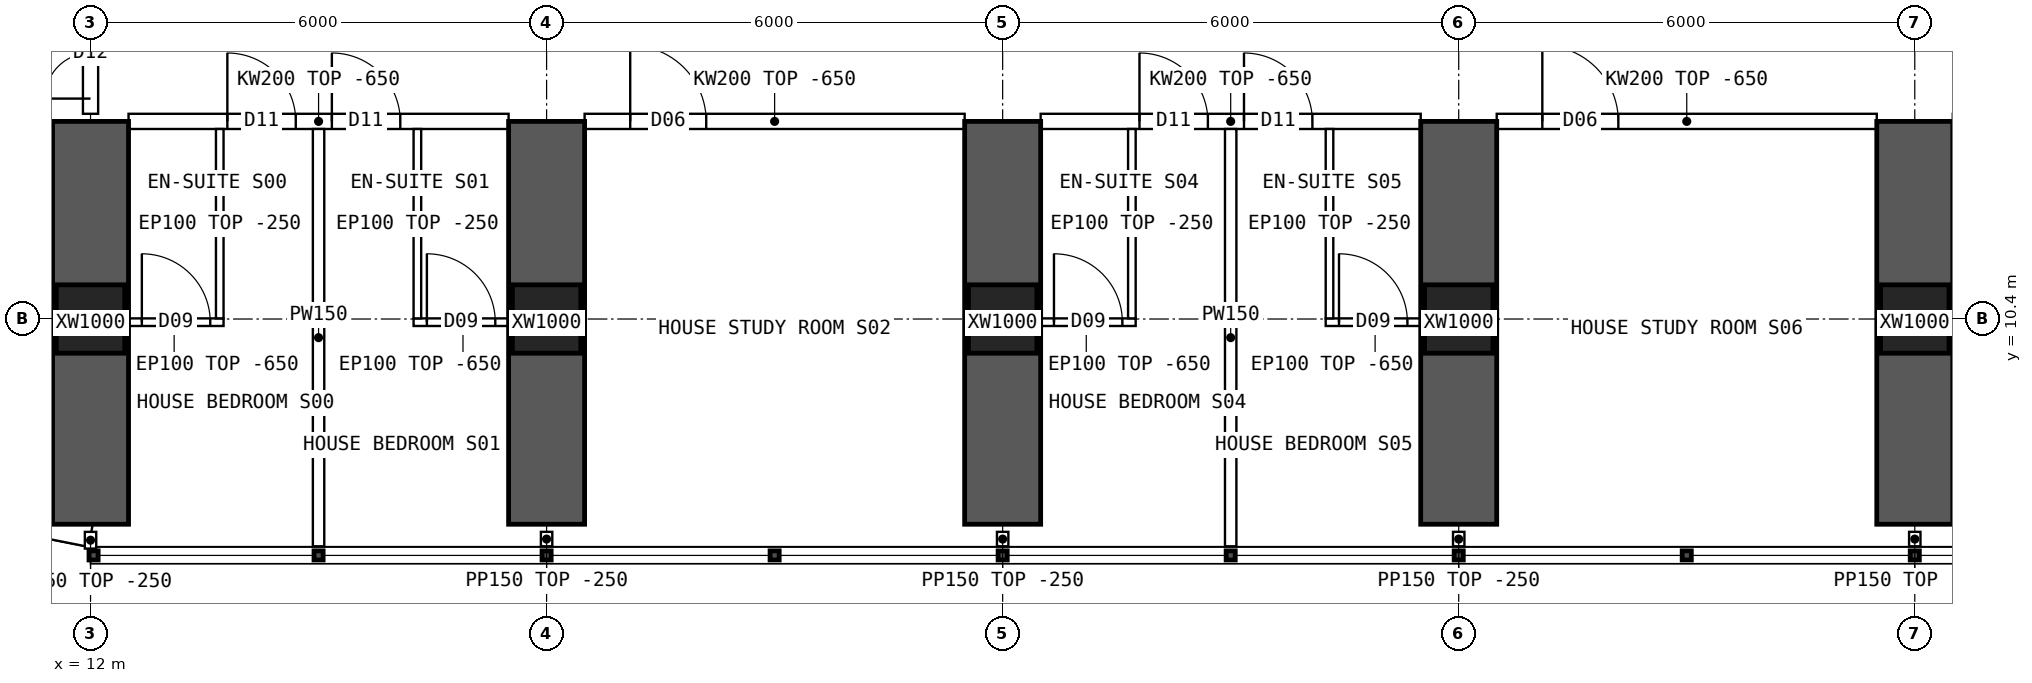
"""IFC4 building model, lengths in metres.
Left out: names, types, materials, properties, quantities, classifications, styles, units other than length and angle.
Written with IfcOpenShell. Run it as: python <this file> out.ifc"""

import sys

from ifc_helpers import new_model, si_unit, direction, frame, frame_2d, origin, origin_2d, place, context, subcontext, project, spatial, polyline, rectangle, hollow_rectangle, outline, extrude, element, fill, save


model = new_model("IFC4")
c1 = context("Model", 3, precision=1e-05, world=origin(), true_north=direction((0.0, 1.0)))
c2 = subcontext(c1, "Body", "Model", "MODEL_VIEW")
j1 = project(units=[si_unit("LENGTHUNIT", "METRE"), si_unit("PLANEANGLEUNIT", "RADIAN")], contexts=[c1])
p1 = place(None, origin())
s1 = spatial("IfcSite", under=j1, at=p1, CompositionType="ELEMENT")
p2 = place(p1, origin())
s2 = spatial("IfcBuilding", under=s1, at=p2, CompositionType="ELEMENT")
p3 = place(p2, frame((0.0, 0.0, 61.45)))
s3 = spatial("IfcBuildingStorey", under=s2, at=p3, CompositionType="ELEMENT", Elevation=61.45)
for number, where, z_axis, x_axis in (
    (1, (12.0, 10.4, 0.0), (0.0, 0.0, 1.0), (1.0, 0.0, 0.0)),
    (2, (18.0, 10.4, 0.0), (0.0, 0.0, 1.0), (1.0, 0.0, 0.0)),
    (3, (24.0, 10.4, 0.0), (0.0, 0.0, 1.0), (1.0, 0.0, 0.0)),
    (4, (30.0, 10.4, 0.0), (0.0, 0.0, 1.0), (1.0, 0.0, 0.0)),
    (5, (36.0, 10.4, 0.0), (0.0, 0.0, 1.0), (1.0, 0.0, 0.0)),
):
    element("IfcColumn", number, at=place(p3, frame(where, z_axis=z_axis, x_axis=x_axis)), inside=s3, PredefinedType="COLUMN", context=c2, shape_type="SweptSolid", body=[
        extrude(hollow_rectangle(XDim=0.9, YDim=0.9, WallThickness=0.09, at=origin_2d()), origin(), (0.0, 0.0, 1.0), 3.75),
    ])
for number, where, z_axis, x_axis in (
    (6, (12.0, 7.7, 0.0), (0.0, 0.0, 1.0), (0.0, 1.0, 0.0)),
    (7, (18.0, 7.7, 0.0), (0.0, 0.0, 1.0), (0.0, 1.0, 0.0)),
    (8, (24.0, 7.7, 0.0), (0.0, 0.0, 1.0), (0.0, 1.0, 0.0)),
    (9, (30.0, 7.7, 0.0), (0.0, 0.0, 1.0), (0.0, 1.0, 0.0)),
    (10, (36.0, 7.7, 0.0), (0.0, 0.0, 1.0), (0.0, 1.0, 0.0)),
):
    element("IfcWall", number, at=place(p3, frame(where, z_axis=z_axis, x_axis=x_axis)), inside=s3, PredefinedType="SHEAR", context=c2, shape_type="SweptSolid", body=[
        extrude(rectangle(XDim=5.3, YDim=1.0, at=frame_2d((2.65, 0.0))), origin(), (0.0, 0.0, 1.0), 3.75),
    ])
p4 = place(p3, frame((8.843, 8.178, 0.0), z_axis=(0.0, 0.0, 1.0), x_axis=(0.980787251524, -0.195080412259, 0.0)))
e11 = element("IfcWall", 11, at=p4, inside=s3, PredefinedType="SOLIDWALL", context=c2, shape_type="SweptSolid", body=[
    extrude(outline(polyline([(-0.03, -0.15), (3.249, -0.15), (3.189, 0.15), (0.03, 0.15), (-0.03, -0.15)])), origin(), (0.0, 0.0, 1.0), 3.5),
])
p5 = place(p4, frame((0.909, 0.0, 0.9)))
e12 = element("IfcOpeningElement", 12, at=p5, cuts=e11, PredefinedType="OPENING", context=c2, shape_type="SweptSolid", body=[
    extrude(rectangle(XDim=1.4, YDim=1.8, at=frame_2d((0.7, 0.9))), frame((0.0, 0.16, 0.0), z_axis=(0.0, -1.0, 0.0), x_axis=(1.0, 0.0, 0.0)), (0.0, 0.0, 1.0), 0.32),
])
p6 = place(p3, frame((12.5, 13.0, 0.0), z_axis=(0.0, 0.0, 1.0), x_axis=(1.0, 0.0, 0.0)))
e13 = element("IfcWall", 13, at=p6, inside=s3, PredefinedType="SOLIDWALL", context=c2, shape_type="SweptSolid", body=[
    extrude(outline(polyline([(0.0, 0.0), (5.0, 0.0), (5.0, 3.1), (0.0, 3.1), (0.0, 0.0)])), frame((0.0, 0.1, 0.0), z_axis=(0.0, -1.0, 0.0), x_axis=(1.0, 0.0, 0.0)), (0.0, 0.0, 1.0), 0.2),
])
p7 = place(p6, frame((1.3, 0.0, 0.0)))
e14 = element("IfcOpeningElement", 14, at=p7, cuts=e13, PredefinedType="OPENING", context=c2, shape_type="SweptSolid", body=[
    extrude(rectangle(XDim=0.9, YDim=2.1, at=frame_2d((0.45, 1.05))), frame((0.0, 0.11, 0.0), z_axis=(0.0, -1.0, 0.0), x_axis=(1.0, 0.0, 0.0)), (0.0, 0.0, 1.0), 0.22),
])
p8 = place(p6, frame((2.675, 0.0, 0.0)))
e15 = element("IfcOpeningElement", 15, at=p8, cuts=e13, PredefinedType="OPENING", context=c2, shape_type="SweptSolid", body=[
    extrude(rectangle(XDim=0.9, YDim=2.1, at=frame_2d((0.45, 1.05))), frame((0.0, 0.11, 0.0), z_axis=(0.0, -1.0, 0.0), x_axis=(1.0, 0.0, 0.0)), (0.0, 0.0, 1.0), 0.22),
])
p9 = place(p3, frame((18.5, 13.0, 0.0), z_axis=(0.0, 0.0, 1.0), x_axis=(1.0, 0.0, 0.0)))
e16 = element("IfcWall", 16, at=p9, inside=s3, PredefinedType="SOLIDWALL", context=c2, shape_type="SweptSolid", body=[
    extrude(outline(polyline([(0.0, 0.0), (5.0, 0.0), (5.0, 3.1), (0.0, 3.1), (0.0, 0.0)])), frame((0.0, 0.1, 0.0), z_axis=(0.0, -1.0, 0.0), x_axis=(1.0, 0.0, 0.0)), (0.0, 0.0, 1.0), 0.2),
])
p10 = place(p9, frame((0.6, 0.0, 0.0)))
e17 = element("IfcOpeningElement", 17, at=p10, cuts=e16, PredefinedType="OPENING", context=c2, shape_type="SweptSolid", body=[
    extrude(rectangle(XDim=1.0, YDim=2.1, at=frame_2d((0.5, 1.05))), frame((0.0, 0.11, 0.0), z_axis=(0.0, -1.0, 0.0), x_axis=(1.0, 0.0, 0.0)), (0.0, 0.0, 1.0), 0.22),
])
p11 = place(p3, frame((24.5, 13.0, 0.0), z_axis=(0.0, 0.0, 1.0), x_axis=(1.0, 0.0, 0.0)))
e18 = element("IfcWall", 18, at=p11, inside=s3, PredefinedType="SOLIDWALL", context=c2, shape_type="SweptSolid", body=[
    extrude(outline(polyline([(0.0, 0.0), (5.0, 0.0), (5.0, 3.1), (0.0, 3.1), (0.0, 0.0)])), frame((0.0, 0.1, 0.0), z_axis=(0.0, -1.0, 0.0), x_axis=(1.0, 0.0, 0.0)), (0.0, 0.0, 1.0), 0.2),
])
p12 = place(p11, frame((1.3, 0.0, 0.0)))
e19 = element("IfcOpeningElement", 19, at=p12, cuts=e18, PredefinedType="OPENING", context=c2, shape_type="SweptSolid", body=[
    extrude(rectangle(XDim=0.9, YDim=2.1, at=frame_2d((0.45, 1.05))), frame((0.0, 0.11, 0.0), z_axis=(0.0, -1.0, 0.0), x_axis=(1.0, 0.0, 0.0)), (0.0, 0.0, 1.0), 0.22),
])
p13 = place(p11, frame((2.675, 0.0, 0.0)))
e20 = element("IfcOpeningElement", 20, at=p13, cuts=e18, PredefinedType="OPENING", context=c2, shape_type="SweptSolid", body=[
    extrude(rectangle(XDim=0.9, YDim=2.1, at=frame_2d((0.45, 1.05))), frame((0.0, 0.11, 0.0), z_axis=(0.0, -1.0, 0.0), x_axis=(1.0, 0.0, 0.0)), (0.0, 0.0, 1.0), 0.22),
])
p14 = place(p3, frame((30.5, 13.0, 0.0), z_axis=(0.0, 0.0, 1.0), x_axis=(1.0, 0.0, 0.0)))
e21 = element("IfcWall", 21, at=p14, inside=s3, PredefinedType="SOLIDWALL", context=c2, shape_type="SweptSolid", body=[
    extrude(outline(polyline([(0.0, 0.0), (5.0, 0.0), (5.0, 3.1), (0.0, 3.1), (0.0, 0.0)])), frame((0.0, 0.1, 0.0), z_axis=(0.0, -1.0, 0.0), x_axis=(1.0, 0.0, 0.0)), (0.0, 0.0, 1.0), 0.2),
])
p15 = place(p14, frame((0.6, 0.0, 0.0)))
e22 = element("IfcOpeningElement", 22, at=p15, cuts=e21, PredefinedType="OPENING", context=c2, shape_type="SweptSolid", body=[
    extrude(rectangle(XDim=1.0, YDim=2.1, at=frame_2d((0.5, 1.05))), frame((0.0, 0.11, 0.0), z_axis=(0.0, -1.0, 0.0), x_axis=(1.0, 0.0, 0.0)), (0.0, 0.0, 1.0), 0.22),
])
p16 = place(p3, frame((15.0, 7.41, 0.0), z_axis=(0.0, 0.0, 1.0), x_axis=(0.0, 1.0, 0.0)))
e23 = element("IfcWall", 23, at=p16, inside=s3, PredefinedType="PARTITIONING", context=c2, shape_type="SweptSolid", body=[
    extrude(outline(polyline([(0.0, 0.0), (5.49, 0.0), (5.49, 3.1), (5.442, 3.1), (5.44, 3.5), (3.192, 3.5), (3.19, 3.1), (2.792, 3.1), (2.79, 3.5), (0.0, 3.5), (0.0, 0.0)])), frame((0.0, 0.075, 0.0), z_axis=(0.0, -1.0, 0.0), x_axis=(1.0, 0.0, 0.0)), (0.0, 0.0, 1.0), 0.15),
])
p17 = place(p3, frame((13.75, 10.358, 0.0), z_axis=(0.0, 0.0, 1.0), x_axis=(-1.0, 0.0, 0.0)))
e24 = element("IfcWall", 24, at=p17, inside=s3, PredefinedType="PARTITIONING", context=c2, shape_type="SweptSolid", body=[
    extrude(outline(polyline([(0.0, 0.0), (1.3, 0.0), (1.3, 3.1), (0.0, 3.1), (0.0, 0.0)])), frame((0.0, 0.05, 0.0), z_axis=(0.0, -1.0, 0.0), x_axis=(1.0, 0.0, 0.0)), (0.0, 0.0, 1.0), 0.1),
])
p18 = place(p17, frame((0.175, 0.0, 0.0)))
e25 = element("IfcOpeningElement", 25, at=p18, cuts=e24, PredefinedType="OPENING", context=c2, shape_type="SweptSolid", body=[
    extrude(rectangle(XDim=0.9, YDim=2.1, at=frame_2d((0.45, 1.05))), frame((0.0, 0.06, 0.0), z_axis=(0.0, -1.0, 0.0), x_axis=(1.0, 0.0, 0.0)), (0.0, 0.0, 1.0), 0.12),
])
p19 = place(p3, frame((13.7, 10.408, 0.0), z_axis=(0.0, 0.0, 1.0), x_axis=(0.0, 1.0, 0.0)))
e26 = element("IfcWall", 26, at=p19, inside=s3, PredefinedType="PARTITIONING", context=c2, shape_type="SweptSolid", body=[
    extrude(outline(polyline([(0.0, 0.0), (2.492, 0.0), (2.492, 3.1), (2.444, 3.1), (2.442, 3.5), (0.194, 3.5), (0.192, 3.1), (0.0, 3.1), (0.0, 0.0)])), frame((0.0, 0.05, 0.0), z_axis=(0.0, -1.0, 0.0), x_axis=(1.0, 0.0, 0.0)), (0.0, 0.0, 1.0), 0.1),
])
p20 = place(p3, frame((17.55, 10.358, 0.0), z_axis=(0.0, 0.0, 1.0), x_axis=(-1.0, 0.0, 0.0)))
e27 = element("IfcWall", 27, at=p20, inside=s3, PredefinedType="PARTITIONING", context=c2, shape_type="SweptSolid", body=[
    extrude(outline(polyline([(0.0, 0.0), (1.3, 0.0), (1.3, 3.1), (0.0, 3.1), (0.0, 0.0)])), frame((0.0, 0.05, 0.0), z_axis=(0.0, -1.0, 0.0), x_axis=(1.0, 0.0, 0.0)), (0.0, 0.0, 1.0), 0.1),
])
p21 = place(p20, frame((0.225, 0.0, 0.0)))
e28 = element("IfcOpeningElement", 28, at=p21, cuts=e27, PredefinedType="OPENING", context=c2, shape_type="SweptSolid", body=[
    extrude(rectangle(XDim=0.9, YDim=2.1, at=frame_2d((0.45, 1.05))), frame((0.0, 0.06, 0.0), z_axis=(0.0, -1.0, 0.0), x_axis=(1.0, 0.0, 0.0)), (0.0, 0.0, 1.0), 0.12),
])
p22 = place(p3, frame((16.3, 10.408, 0.0), z_axis=(0.0, 0.0, 1.0), x_axis=(0.0, 1.0, 0.0)))
e29 = element("IfcWall", 29, at=p22, inside=s3, PredefinedType="PARTITIONING", context=c2, shape_type="SweptSolid", body=[
    extrude(outline(polyline([(0.0, 0.0), (2.492, 0.0), (2.492, 3.1), (2.444, 3.1), (2.442, 3.5), (0.194, 3.5), (0.192, 3.1), (0.0, 3.1), (0.0, 0.0)])), frame((0.0, 0.05, 0.0), z_axis=(0.0, -1.0, 0.0), x_axis=(1.0, 0.0, 0.0)), (0.0, 0.0, 1.0), 0.1),
])
p23 = place(p3, frame((27.0, 7.41, 0.0), z_axis=(0.0, 0.0, 1.0), x_axis=(0.0, 1.0, 0.0)))
e30 = element("IfcWall", 30, at=p23, inside=s3, PredefinedType="PARTITIONING", context=c2, shape_type="SweptSolid", body=[
    extrude(outline(polyline([(0.0, 0.0), (5.49, 0.0), (5.49, 3.1), (5.442, 3.1), (5.44, 3.5), (3.192, 3.5), (3.19, 3.1), (2.792, 3.1), (2.79, 3.5), (0.0, 3.5), (0.0, 0.0)])), frame((0.0, 0.075, 0.0), z_axis=(0.0, -1.0, 0.0), x_axis=(1.0, 0.0, 0.0)), (0.0, 0.0, 1.0), 0.15),
])
p24 = place(p3, frame((25.75, 10.358, 0.0), z_axis=(0.0, 0.0, 1.0), x_axis=(-1.0, 0.0, 0.0)))
e31 = element("IfcWall", 31, at=p24, inside=s3, PredefinedType="PARTITIONING", context=c2, shape_type="SweptSolid", body=[
    extrude(outline(polyline([(0.0, 0.0), (1.3, 0.0), (1.3, 3.1), (0.0, 3.1), (0.0, 0.0)])), frame((0.0, 0.05, 0.0), z_axis=(0.0, -1.0, 0.0), x_axis=(1.0, 0.0, 0.0)), (0.0, 0.0, 1.0), 0.1),
])
p25 = place(p24, frame((0.175, 0.0, 0.0)))
e32 = element("IfcOpeningElement", 32, at=p25, cuts=e31, PredefinedType="OPENING", context=c2, shape_type="SweptSolid", body=[
    extrude(rectangle(XDim=0.9, YDim=2.1, at=frame_2d((0.45, 1.05))), frame((0.0, 0.06, 0.0), z_axis=(0.0, -1.0, 0.0), x_axis=(1.0, 0.0, 0.0)), (0.0, 0.0, 1.0), 0.12),
])
p26 = place(p3, frame((25.7, 10.408, 0.0), z_axis=(0.0, 0.0, 1.0), x_axis=(0.0, 1.0, 0.0)))
e33 = element("IfcWall", 33, at=p26, inside=s3, PredefinedType="PARTITIONING", context=c2, shape_type="SweptSolid", body=[
    extrude(outline(polyline([(0.0, 0.0), (2.492, 0.0), (2.492, 3.1), (2.444, 3.1), (2.442, 3.5), (0.194, 3.5), (0.192, 3.1), (0.0, 3.1), (0.0, 0.0)])), frame((0.0, 0.05, 0.0), z_axis=(0.0, -1.0, 0.0), x_axis=(1.0, 0.0, 0.0)), (0.0, 0.0, 1.0), 0.1),
])
p27 = place(p3, frame((29.55, 10.358, 0.0), z_axis=(0.0, 0.0, 1.0), x_axis=(-1.0, 0.0, 0.0)))
e34 = element("IfcWall", 34, at=p27, inside=s3, PredefinedType="PARTITIONING", context=c2, shape_type="SweptSolid", body=[
    extrude(outline(polyline([(0.0, 0.0), (1.3, 0.0), (1.3, 3.1), (0.0, 3.1), (0.0, 0.0)])), frame((0.0, 0.05, 0.0), z_axis=(0.0, -1.0, 0.0), x_axis=(1.0, 0.0, 0.0)), (0.0, 0.0, 1.0), 0.1),
])
p28 = place(p27, frame((0.225, 0.0, 0.0)))
e35 = element("IfcOpeningElement", 35, at=p28, cuts=e34, PredefinedType="OPENING", context=c2, shape_type="SweptSolid", body=[
    extrude(rectangle(XDim=0.9, YDim=2.1, at=frame_2d((0.45, 1.05))), frame((0.0, 0.06, 0.0), z_axis=(0.0, -1.0, 0.0), x_axis=(1.0, 0.0, 0.0)), (0.0, 0.0, 1.0), 0.12),
])
p29 = place(p3, frame((28.3, 10.408, 0.0), z_axis=(0.0, 0.0, 1.0), x_axis=(0.0, 1.0, 0.0)))
e36 = element("IfcWall", 36, at=p29, inside=s3, PredefinedType="PARTITIONING", context=c2, shape_type="SweptSolid", body=[
    extrude(outline(polyline([(0.0, 0.0), (2.492, 0.0), (2.492, 3.1), (2.444, 3.1), (2.442, 3.5), (0.194, 3.5), (0.192, 3.1), (0.0, 3.1), (0.0, 0.0)])), frame((0.0, 0.05, 0.0), z_axis=(0.0, -1.0, 0.0), x_axis=(1.0, 0.0, 0.0)), (0.0, 0.0, 1.0), 0.1),
])
p30 = place(p3, frame((12.0, 13.1, 0.0), z_axis=(0.0, 0.0, 1.0), x_axis=(0.0, 1.0, 0.0)))
e37 = element("IfcWall", 37, at=p30, inside=s3, PredefinedType="SOLIDWALL", context=c2, shape_type="SweptSolid", body=[
    extrude(outline(polyline([(0.0, 0.0), (1.6, 0.0), (1.6, 3.05), (0.0, 3.05), (0.0, 0.0)])), frame((0.0, 0.1, 0.0), z_axis=(0.0, -1.0, 0.0), x_axis=(1.0, 0.0, 0.0)), (0.0, 0.0, 1.0), 0.2),
])
p31 = place(p30, frame((0.2, 0.0, 0.0)))
e38 = element("IfcOpeningElement", 38, at=p31, cuts=e37, PredefinedType="OPENING", context=c2, shape_type="SweptSolid", body=[
    extrude(rectangle(XDim=1.2, YDim=2.1, at=frame_2d((0.6, 1.05))), frame((0.0, 0.11, 0.0), z_axis=(0.0, -1.0, 0.0), x_axis=(1.0, 0.0, 0.0)), (0.0, 0.0, 1.0), 0.22),
])
p32 = place(p3, frame((12.0, 7.6, 0.0), z_axis=(0.0, 0.0, 1.0), x_axis=(0.0, -1.0, 0.0)))
e39 = element("IfcWall", 39, at=p32, inside=s3, PredefinedType="PARTITIONING", context=c2, shape_type="SweptSolid", body=[
    extrude(rectangle(XDim=0.22, YDim=0.15, at=frame_2d((0.11, 0.0))), origin(), (0.0, 0.0, 1.0), 3.5),
])
for number, where, z_axis, x_axis in (
    (40, (18.0, 7.6, 0.0), (0.0, 0.0, 1.0), (0.0, -1.0, 0.0)),
    (41, (24.0, 7.6, 0.0), (0.0, 0.0, 1.0), (0.0, -1.0, 0.0)),
    (42, (30.0, 7.6, 0.0), (0.0, 0.0, 1.0), (0.0, -1.0, 0.0)),
    (43, (36.0, 7.6, 0.0), (0.0, 0.0, 1.0), (0.0, -1.0, 0.0)),
):
    element("IfcWall", number, at=place(p3, frame(where, z_axis=z_axis, x_axis=x_axis)), inside=s3, PredefinedType="PARTITIONING", context=c2, shape_type="SweptSolid", body=[
        extrude(rectangle(XDim=0.19, YDim=0.15, at=frame_2d((0.095, 0.0))), origin(), (0.0, 0.0, 1.0), 3.5),
    ])
p33 = place(p18, origin())
e44 = element("IfcDoor", 44, at=p33, inside=s3, OperationType="SINGLE_SWING_RIGHT", PredefinedType="DOOR", context=c2, shape_type="SweptSolid", body=[
    extrude(rectangle(XDim=0.9, YDim=2.1, at=frame_2d((0.45, 1.05))), frame((0.0, 0.025, 0.0), z_axis=(0.0, -1.0, 0.0), x_axis=(1.0, 0.0, 0.0)), (0.0, 0.0, 1.0), 0.05),
])
fill(e25, e44)
p34 = place(p7, origin())
e45 = element("IfcDoor", 45, at=p34, inside=s3, OperationType="SINGLE_SWING_LEFT", PredefinedType="DOOR", context=c2, shape_type="SweptSolid", body=[
    extrude(rectangle(XDim=0.9, YDim=2.1, at=frame_2d((0.45, 1.05))), frame((0.0, 0.025, 0.0), z_axis=(0.0, -1.0, 0.0), x_axis=(1.0, 0.0, 0.0)), (0.0, 0.0, 1.0), 0.05),
])
fill(e14, e45)
p35 = place(p21, origin())
e46 = element("IfcDoor", 46, at=p35, inside=s3, OperationType="SINGLE_SWING_RIGHT", PredefinedType="DOOR", context=c2, shape_type="SweptSolid", body=[
    extrude(rectangle(XDim=0.9, YDim=2.1, at=frame_2d((0.45, 1.05))), frame((0.0, 0.025, 0.0), z_axis=(0.0, -1.0, 0.0), x_axis=(1.0, 0.0, 0.0)), (0.0, 0.0, 1.0), 0.05),
])
fill(e28, e46)
p36 = place(p8, origin())
e47 = element("IfcDoor", 47, at=p36, inside=s3, OperationType="SINGLE_SWING_LEFT", PredefinedType="DOOR", context=c2, shape_type="SweptSolid", body=[
    extrude(rectangle(XDim=0.9, YDim=2.1, at=frame_2d((0.45, 1.05))), frame((0.0, 0.025, 0.0), z_axis=(0.0, -1.0, 0.0), x_axis=(1.0, 0.0, 0.0)), (0.0, 0.0, 1.0), 0.05),
])
fill(e15, e47)
p37 = place(p10, origin())
e48 = element("IfcDoor", 48, at=p37, inside=s3, OperationType="SINGLE_SWING_LEFT", PredefinedType="DOOR", context=c2, shape_type="SweptSolid", body=[
    extrude(rectangle(XDim=1.0, YDim=2.1, at=frame_2d((0.5, 1.05))), frame((0.0, 0.025, 0.0), z_axis=(0.0, -1.0, 0.0), x_axis=(1.0, 0.0, 0.0)), (0.0, 0.0, 1.0), 0.05),
])
fill(e17, e48)
p38 = place(p25, origin())
e49 = element("IfcDoor", 49, at=p38, inside=s3, OperationType="SINGLE_SWING_RIGHT", PredefinedType="DOOR", context=c2, shape_type="SweptSolid", body=[
    extrude(rectangle(XDim=0.9, YDim=2.1, at=frame_2d((0.45, 1.05))), frame((0.0, 0.025, 0.0), z_axis=(0.0, -1.0, 0.0), x_axis=(1.0, 0.0, 0.0)), (0.0, 0.0, 1.0), 0.05),
])
fill(e32, e49)
p39 = place(p12, origin())
e50 = element("IfcDoor", 50, at=p39, inside=s3, OperationType="SINGLE_SWING_LEFT", PredefinedType="DOOR", context=c2, shape_type="SweptSolid", body=[
    extrude(rectangle(XDim=0.9, YDim=2.1, at=frame_2d((0.45, 1.05))), frame((0.0, 0.025, 0.0), z_axis=(0.0, -1.0, 0.0), x_axis=(1.0, 0.0, 0.0)), (0.0, 0.0, 1.0), 0.05),
])
fill(e19, e50)
p40 = place(p28, origin())
e51 = element("IfcDoor", 51, at=p40, inside=s3, OperationType="SINGLE_SWING_RIGHT", PredefinedType="DOOR", context=c2, shape_type="SweptSolid", body=[
    extrude(rectangle(XDim=0.9, YDim=2.1, at=frame_2d((0.45, 1.05))), frame((0.0, 0.025, 0.0), z_axis=(0.0, -1.0, 0.0), x_axis=(1.0, 0.0, 0.0)), (0.0, 0.0, 1.0), 0.05),
])
fill(e35, e51)
p41 = place(p13, origin())
e52 = element("IfcDoor", 52, at=p41, inside=s3, OperationType="SINGLE_SWING_LEFT", PredefinedType="DOOR", context=c2, shape_type="SweptSolid", body=[
    extrude(rectangle(XDim=0.9, YDim=2.1, at=frame_2d((0.45, 1.05))), frame((0.0, 0.025, 0.0), z_axis=(0.0, -1.0, 0.0), x_axis=(1.0, 0.0, 0.0)), (0.0, 0.0, 1.0), 0.05),
])
fill(e20, e52)
p42 = place(p15, origin())
e53 = element("IfcDoor", 53, at=p42, inside=s3, OperationType="SINGLE_SWING_LEFT", PredefinedType="DOOR", context=c2, shape_type="SweptSolid", body=[
    extrude(rectangle(XDim=1.0, YDim=2.1, at=frame_2d((0.5, 1.05))), frame((0.0, 0.025, 0.0), z_axis=(0.0, -1.0, 0.0), x_axis=(1.0, 0.0, 0.0)), (0.0, 0.0, 1.0), 0.05),
])
fill(e22, e53)
p43 = place(p31, origin())
e54 = element("IfcDoor", 54, at=p43, inside=s3, OperationType="DOUBLE_DOOR_SINGLE_SWING", PredefinedType="DOOR", context=c2, shape_type="SweptSolid", body=[
    extrude(rectangle(XDim=1.2, YDim=2.1, at=frame_2d((0.6, 1.05))), frame((0.0, 0.025, 0.0), z_axis=(0.0, -1.0, 0.0), x_axis=(1.0, 0.0, 0.0)), (0.0, 0.0, 1.0), 0.05),
])
fill(e38, e54)
save(model, sys.argv[1])
